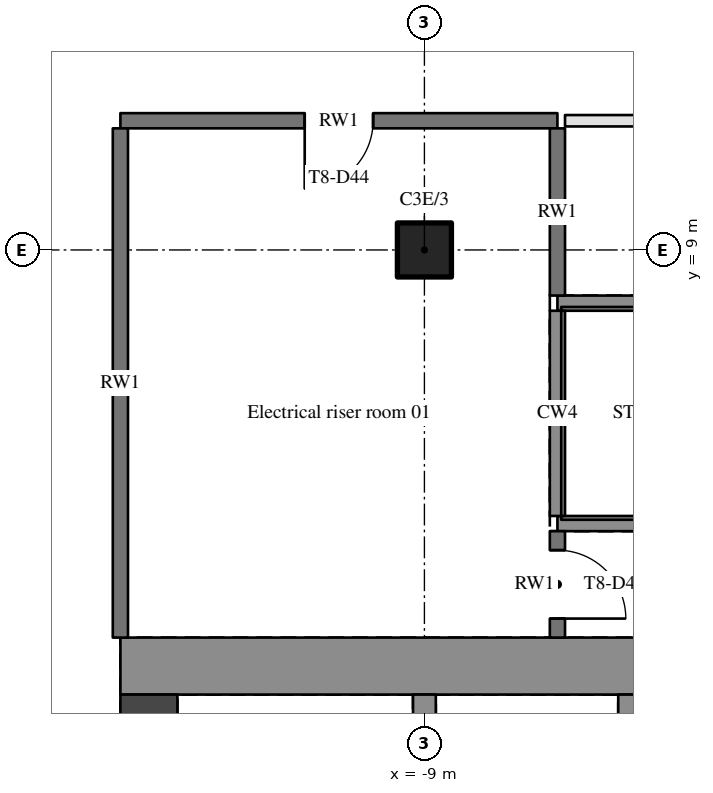
"""IFC4 building model, lengths in metres.
Left out: names, types, materials, properties, quantities, classifications, styles, units other than length and angle.
Written with IfcOpenShell. Run it as: python <this file> out.ifc"""

import sys

from ifc_helpers import new_model, si_unit, direction, frame, frame_2d, origin, origin_2d, place, context, subcontext, project, spatial, rectangle, hollow_circle, extrude, element, fill, save


model = new_model("IFC4")
c1 = context("Model", 3, precision=1e-05, world=origin(), true_north=direction((0.0, 1.0)))
c2 = subcontext(c1, "Body", "Model", "MODEL_VIEW")
j1 = project(units=[si_unit("LENGTHUNIT", "METRE"), si_unit("PLANEANGLEUNIT", "RADIAN")], contexts=[c1])
p1 = place(None, origin())
s1 = spatial("IfcSite", under=j1, at=p1, CompositionType="ELEMENT")
p2 = place(p1, origin())
s2 = spatial("IfcBuilding", under=s1, at=p2, CompositionType="ELEMENT")
p3 = place(p2, frame((0.0, 0.0, 121.5)))
s3 = spatial("IfcBuildingStorey", under=s2, at=p3, CompositionType="ELEMENT", Elevation=121.5)
p4 = place(p3, frame((-9.0, 9.0, 0.0), z_axis=(0.0, 0.0, 1.0), x_axis=(1.0, 0.0, 0.0)))
e1 = element("IfcColumn", 1, at=p4, inside=s3, PredefinedType="COLUMN", context=c2, shape_type="SweptSolid", body=[
    extrude(hollow_circle(Radius=0.355, WallThickness=0.032, at=origin_2d()), origin(), (0.0, 0.0, 1.0), 3.4),
])
p5 = place(p3, frame((-13.0, 3.525, 0.0), z_axis=(0.0, 0.0, 1.0), x_axis=(1.0, 0.0, 0.0)))
e2 = element("IfcWall", 2, at=p5, inside=s3, PredefinedType="SHEAR", context=c2, shape_type="SweptSolid", body=[
    extrude(rectangle(XDim=26.0, YDim=0.75, at=frame_2d((13.0, 0.0))), origin(), (0.0, 0.0, 1.0), 3.4),
])
p6 = place(p3, frame((-12.625, -11.5, 0.0), z_axis=(0.0, 0.0, 1.0), x_axis=(0.0, 1.0, 0.0)))
e3 = element("IfcWall", 3, at=p6, inside=s3, PredefinedType="SHEAR", context=c2, shape_type="SweptSolid", body=[
    extrude(rectangle(XDim=14.65, YDim=0.75, at=frame_2d((7.325, 0.0))), origin(), (0.0, 0.0, 1.0), 3.4),
])
p7 = place(p6, frame((9.6, 0.0, 0.0)))
e4 = element("IfcOpeningElement", 4, at=p7, cuts=e3, PredefinedType="OPENING", context=c2, shape_type="SweptSolid", body=[
    extrude(rectangle(XDim=1.8, YDim=2.1, at=frame_2d((0.9, 1.05))), frame((0.0, 0.385, 0.0), z_axis=(0.0, -1.0, 0.0), x_axis=(1.0, 0.0, 0.0)), (0.0, 0.0, 1.0), 0.77),
])
p8 = place(p3, frame((-7.25, 5.4, 0.0), z_axis=(0.0, 0.0, 1.0), x_axis=(1.0, 0.0, 0.0)))
e5 = element("IfcWall", 5, at=p8, inside=s3, PredefinedType="SHEAR", context=c2, shape_type="SweptSolid", body=[
    extrude(rectangle(XDim=6.6, YDim=0.2, at=frame_2d((3.3, 0.0))), origin(), (0.0, 0.0, 1.0), 3.4),
])
p9 = place(p3, frame((-0.65, 8.3, 0.0), z_axis=(0.0, 0.0, 1.0), x_axis=(-1.0, 0.0, 0.0)))
e6 = element("IfcWall", 6, at=p9, inside=s3, PredefinedType="SHEAR", context=c2, shape_type="SweptSolid", body=[
    extrude(rectangle(XDim=6.6, YDim=0.2, at=frame_2d((3.3, 0.0))), origin(), (0.0, 0.0, 1.0), 3.4),
])
p10 = place(p9, frame((0.2, 0.0, 0.0)))
e7 = element("IfcOpeningElement", 7, at=p10, cuts=e6, PredefinedType="OPENING", context=c2, shape_type="SweptSolid", body=[
    extrude(rectangle(XDim=1.1, YDim=2.1, at=frame_2d((0.55, 1.05))), frame((0.0, 0.11, 0.0), z_axis=(0.0, -1.0, 0.0), x_axis=(1.0, 0.0, 0.0)), (0.0, 0.0, 1.0), 0.22),
])
p11 = place(p3, frame((-7.25, 10.7, 0.0), z_axis=(0.0, 0.0, 1.0), x_axis=(-1.0, 0.0, 0.0)))
e8 = element("IfcWall", 8, at=p11, inside=s3, PredefinedType="SOLIDWALL", context=c2, shape_type="SweptSolid", body=[
    extrude(rectangle(XDim=5.75, YDim=0.2, at=frame_2d((2.875, 0.0))), origin(), (0.0, 0.0, 1.0), 2.46),
])
p12 = place(p11, frame((2.425, 0.0, 0.0)))
e9 = element("IfcOpeningElement", 9, at=p12, cuts=e8, PredefinedType="OPENING", context=c2, shape_type="SweptSolid", body=[
    extrude(rectangle(XDim=0.9, YDim=2.1, at=frame_2d((0.45, 1.05))), frame((0.0, 0.11, 0.0), z_axis=(0.0, -1.0, 0.0), x_axis=(1.0, 0.0, 0.0)), (0.0, 0.0, 1.0), 0.22),
])
p13 = place(p3, frame((-0.1, 10.7, 0.0), z_axis=(0.0, 0.0, 1.0), x_axis=(-1.0, 0.0, 0.0)))
e10 = element("IfcWall", 10, at=p13, inside=s3, PredefinedType="PARTITIONING", context=c2, shape_type="SweptSolid", body=[
    extrude(rectangle(XDim=7.05, YDim=0.15, at=frame_2d((3.525, 0.0))), origin(), (0.0, 0.0, 1.0), 2.46),
])
p14 = place(p13, frame((3.025, 0.0, 0.0)))
e11 = element("IfcOpeningElement", 11, at=p14, cuts=e10, PredefinedType="OPENING", context=c2, shape_type="SweptSolid", body=[
    extrude(rectangle(XDim=1.0, YDim=2.1, at=frame_2d((0.5, 1.05))), frame((0.0, 0.085, 0.0), z_axis=(0.0, -1.0, 0.0), x_axis=(1.0, 0.0, 0.0)), (0.0, 0.0, 1.0), 0.17),
])
p15 = place(p3, frame((-13.0, 3.9, 0.0), z_axis=(0.0, 0.0, 1.0), x_axis=(0.0, 1.0, 0.0)))
e12 = element("IfcWall", 12, at=p15, inside=s3, PredefinedType="SOLIDWALL", context=c2, shape_type="SweptSolid", body=[
    extrude(rectangle(XDim=6.7, YDim=0.2, at=frame_2d((3.35, 0.0))), origin(), (0.0, 0.0, 1.0), 2.46),
])
p16 = place(p3, frame((-9.0, 0.8, 0.0), z_axis=(0.0, 0.0, 1.0), x_axis=(0.0, 1.0, 0.0)))
e13 = element("IfcWall", 13, at=p16, inside=s3, PredefinedType="SHEAR", context=c2, shape_type="SweptSolid", body=[
    extrude(rectangle(XDim=2.35, YDim=0.3, at=frame_2d((1.175, 0.0))), origin(), (0.0, 0.0, 1.0), 3.4),
])
p17 = place(p3, frame((-7.25, 5.3, 0.0), z_axis=(0.0, 0.0, 1.0), x_axis=(0.0, -1.0, 0.0)))
e14 = element("IfcWall", 14, at=p17, inside=s3, PredefinedType="SOLIDWALL", context=c2, shape_type="SweptSolid", body=[
    extrude(rectangle(XDim=1.4, YDim=0.2, at=frame_2d((0.7, 0.0))), origin(), (0.0, 0.0, 1.0), 2.46),
])
p18 = place(p17, frame((0.25, 0.0, 0.0)))
e15 = element("IfcOpeningElement", 15, at=p18, cuts=e14, PredefinedType="OPENING", context=c2, shape_type="SweptSolid", body=[
    extrude(rectangle(XDim=0.9, YDim=2.1, at=frame_2d((0.45, 1.05))), frame((0.0, 0.11, 0.0), z_axis=(0.0, -1.0, 0.0), x_axis=(1.0, 0.0, 0.0)), (0.0, 0.0, 1.0), 0.22),
])
p19 = place(p3, frame((-7.25, 5.5, 0.0), z_axis=(0.0, 0.0, 1.0), x_axis=(0.0, 1.0, 0.0)))
e16 = element("IfcWall", 16, at=p19, inside=s3, PredefinedType="SHEAR", context=c2, shape_type="SweptSolid", body=[
    extrude(rectangle(XDim=2.7, YDim=0.2, at=frame_2d((1.35, 0.0))), origin(), (0.0, 0.0, 1.0), 3.4),
])
p20 = place(p3, frame((-7.25, 8.4, 0.0), z_axis=(0.0, 0.0, 1.0), x_axis=(0.0, 1.0, 0.0)))
e17 = element("IfcWall", 17, at=p20, inside=s3, PredefinedType="SOLIDWALL", context=c2, shape_type="SweptSolid", body=[
    extrude(rectangle(XDim=2.2, YDim=0.2, at=frame_2d((1.1, 0.0))), origin(), (0.0, 0.0, 1.0), 2.46),
])
p21 = place(p3, frame((-6.3, 0.65, 0.0), z_axis=(0.0, 0.0, 1.0), x_axis=(0.0, 1.0, 0.0)))
e18 = element("IfcWall", 18, at=p21, inside=s3, PredefinedType="SHEAR", context=c2, shape_type="SweptSolid", body=[
    extrude(rectangle(XDim=2.5, YDim=0.3, at=frame_2d((1.25, 0.0))), origin(), (0.0, 0.0, 1.0), 3.4),
])
p22 = place(p18, origin())
e19 = element("IfcDoor", 19, at=p22, inside=s3, OperationType="SINGLE_SWING_RIGHT", PredefinedType="DOOR", context=c2, shape_type="SweptSolid", body=[
    extrude(rectangle(XDim=0.9, YDim=2.1, at=frame_2d((0.45, 1.05))), frame((0.0, 0.025, 0.0), z_axis=(0.0, -1.0, 0.0), x_axis=(1.0, 0.0, 0.0)), (0.0, 0.0, 1.0), 0.05),
])
fill(e15, e19)
p23 = place(p12, origin())
e20 = element("IfcDoor", 20, at=p23, inside=s3, OperationType="SINGLE_SWING_RIGHT", PredefinedType="DOOR", context=c2, shape_type="SweptSolid", body=[
    extrude(rectangle(XDim=0.9, YDim=2.1, at=frame_2d((0.45, 1.05))), frame((0.0, 0.025, 0.0), z_axis=(0.0, -1.0, 0.0), x_axis=(1.0, 0.0, 0.0)), (0.0, 0.0, 1.0), 0.05),
])
fill(e9, e20)
save(model, sys.argv[1])
